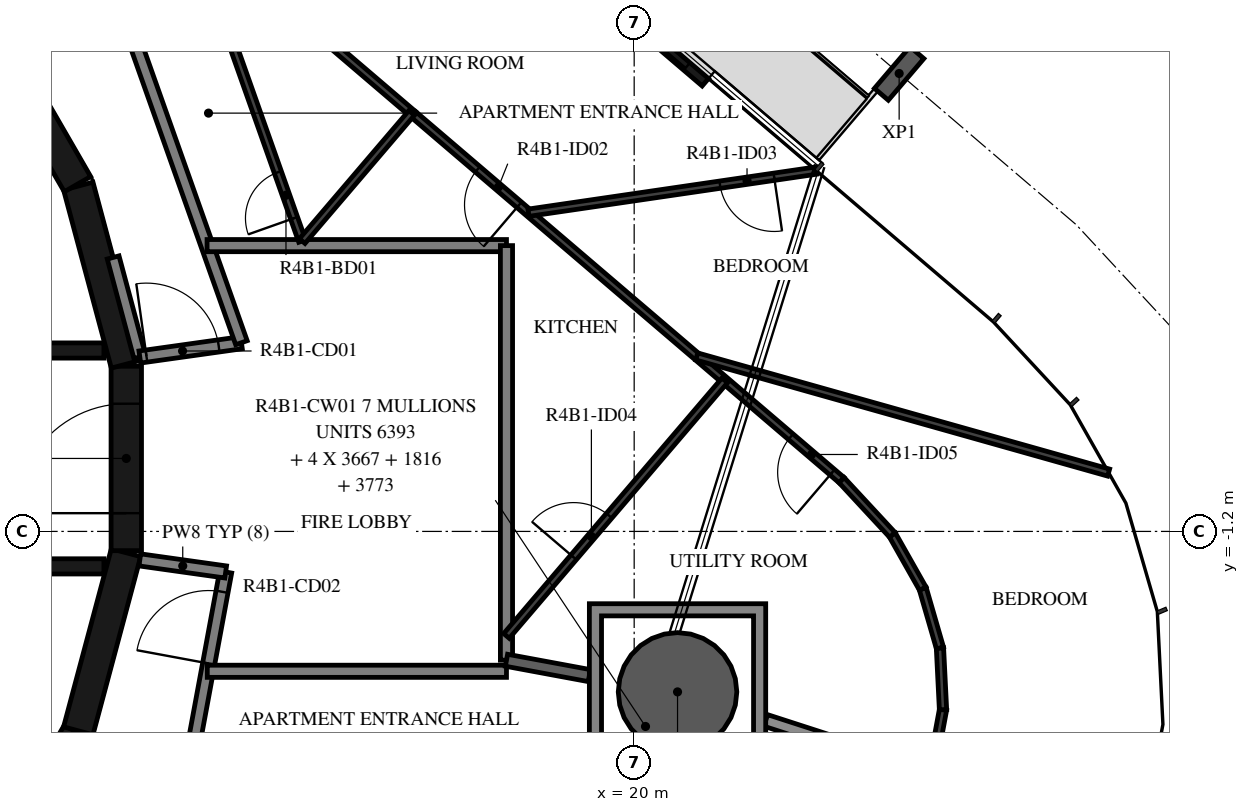
"""IFC4 building model, lengths in metres.
Left out: names, types, materials, properties, quantities, classifications, styles, units other than length and angle.
Written with IfcOpenShell. Run it as: python <this file> out.ifc"""

import sys

from ifc_helpers import new_model, si_unit, direction, frame, frame_2d, origin, origin_2d, place, context, subcontext, project, spatial, polyline, rectangle, hollow_circle, i_section, outline, extrude, element, fill, save


model = new_model("IFC4")
c1 = context("Model", 3, precision=1e-05, world=origin(), true_north=direction((0.0, 1.0)))
c2 = subcontext(c1, "Body", "Model", "MODEL_VIEW")
j1 = project(units=[si_unit("LENGTHUNIT", "METRE"), si_unit("PLANEANGLEUNIT", "RADIAN")], contexts=[c1])
p1 = place(None, origin())
s1 = spatial("IfcSite", under=j1, at=p1, CompositionType="ELEMENT")
p2 = place(p1, origin())
s2 = spatial("IfcBuilding", under=s1, at=p2, CompositionType="ELEMENT")
p3 = place(p2, frame((0.0, 0.0, 162.2)))
s3 = spatial("IfcBuildingStorey", under=s2, at=p3, CompositionType="ELEMENT", Elevation=162.2)
p4 = place(p3, frame((20.713, -3.839, -0.38), z_axis=(0.0, 0.0, 1.0), x_axis=(1.0, 0.0, 0.0)))
e1 = element("IfcColumn", 1, at=p4, inside=s3, PredefinedType="COLUMN", context=c2, shape_type="SweptSolid", body=[
    extrude(hollow_circle(Radius=0.975, WallThickness=0.045, at=origin_2d()), origin(), (0.0, 0.0, 1.0), 3.5),
])
p5 = place(p3, frame((24.358, 6.331, -0.38), z_axis=(0.0, 0.0, 1.0), x_axis=(0.76040600398, -0.649448003393, 0.0)))
e2 = element("IfcColumn", 2, at=p5, inside=s3, PredefinedType="COLUMN", context=c2, shape_type="SweptSolid", body=[
    extrude(i_section(OverallWidth=0.3, OverallDepth=0.9, WebThickness=0.019, FlangeThickness=0.035, FilletRadius=0.03, at=origin_2d()), origin(), (0.0, 0.0, 1.0), 3.5),
])
p6 = place(p3, frame((21.17, 6.186, 0.0), z_axis=(0.0, 0.0, 1.0), x_axis=(-0.760359548534, 0.649502391799, 0.0)))
e3 = element("IfcWall", 3, at=p6, inside=s3, PredefinedType="STANDARD", context=c2, shape_type="SweptSolid", body=[
    extrude(rectangle(XDim=3.2, YDim=0.16, at=frame_2d((1.6, 0.0))), origin(), (0.0, 0.0, 1.0), 3.12),
])
p7 = place(p6, frame((0.4, 0.0, 0.0)))
e4 = element("IfcOpeningElement", 4, at=p7, cuts=e3, PredefinedType="OPENING", context=c2, shape_type="SweptSolid", body=[
    extrude(rectangle(XDim=2.4, YDim=2.4, at=frame_2d((1.2, 1.2))), frame((0.0, 0.09, 0.0), z_axis=(0.0, -1.0, 0.0), x_axis=(1.0, 0.0, 0.0)), (0.0, 0.0, 1.0), 0.18),
])
for number, where, z_axis, x_axis in (
    (5, (9.329, -7.137, 0.0), (0.0, 0.0, 1.0), (0.5, 0.866, 0.0)),
    (6, (10.858, -4.479, 0.0), (0.0, 0.0, 1.0), (0.259, 0.966, 0.0)),
):
    element("IfcWall", number, at=place(p3, frame(where, z_axis=z_axis, x_axis=x_axis)), inside=s3, PredefinedType="SHEAR", context=c2, shape_type="SweptSolid", body=[
        extrude(rectangle(XDim=3.033, YDim=0.5, at=frame_2d((1.516, 0.0))), origin(), (0.0, 0.0, 1.0), 3.12),
    ])
p8 = place(p3, frame((11.647, -1.516, 0.0), z_axis=(0.0, 0.0, 1.0), x_axis=(0.0, 1.0, 0.0)))
e7 = element("IfcWall", 7, at=p8, inside=s3, PredefinedType="SHEAR", context=c2, shape_type="SweptSolid", body=[
    extrude(rectangle(XDim=3.033, YDim=0.5, at=frame_2d((1.516, 0.0))), origin(), (0.0, 0.0, 1.0), 3.12),
])
p9 = place(p8, frame((0.616, 0.0, 0.0)))
e8 = element("IfcOpeningElement", 8, at=p9, cuts=e7, PredefinedType="OPENING", context=c2, shape_type="SweptSolid", body=[
    extrude(rectangle(XDim=1.8, YDim=2.1, at=frame_2d((0.9, 1.05))), frame((0.0, 0.26, 0.0), z_axis=(0.0, -1.0, 0.0), x_axis=(1.0, 0.0, 0.0)), (0.0, 0.0, 1.0), 0.52),
])
for number, where, z_axis, x_axis in (
    (9, (11.643, 1.55, 0.0), (0.0, 0.0, 1.0), (-0.259, 0.966, 0.0)),
    (10, (10.845, 4.51, 0.0), (0.0, 0.0, 1.0), (-0.5, 0.866, 0.0)),
):
    element("IfcWall", number, at=place(p3, frame(where, z_axis=z_axis, x_axis=x_axis)), inside=s3, PredefinedType="SHEAR", context=c2, shape_type="SweptSolid", body=[
        extrude(rectangle(XDim=3.033, YDim=0.5, at=frame_2d((1.516, 0.0))), origin(), (0.0, 0.0, 1.0), 3.12),
    ])
p10 = place(p3, frame((3.35, 1.775, 0.0), z_axis=(0.0, 0.0, 1.0), x_axis=(1.0, 0.0, 0.0)))
e11 = element("IfcWall", 11, at=p10, inside=s3, PredefinedType="SHEAR", context=c2, shape_type="SweptSolid", body=[
    extrude(rectangle(XDim=7.93, YDim=0.25, at=frame_2d((3.965, 0.0))), origin(), (0.0, 0.0, 1.0), 3.12),
])
p11 = place(p10, frame((0.35, 0.0, 0.0)))
e12 = element("IfcOpeningElement", 12, at=p11, cuts=e11, PredefinedType="OPENING", context=c2, shape_type="SweptSolid", body=[
    extrude(rectangle(XDim=1.2, YDim=2.4, at=frame_2d((0.6, 1.2))), frame((0.0, 0.135, 0.0), z_axis=(0.0, -1.0, 0.0), x_axis=(1.0, 0.0, 0.0)), (0.0, 0.0, 1.0), 0.27),
])
p12 = place(p10, frame((2.5, 0.0, 0.0)))
e13 = element("IfcOpeningElement", 13, at=p12, cuts=e11, PredefinedType="OPENING", context=c2, shape_type="SweptSolid", body=[
    extrude(rectangle(XDim=1.2, YDim=2.4, at=frame_2d((0.6, 1.2))), frame((0.0, 0.135, 0.0), z_axis=(0.0, -1.0, 0.0), x_axis=(1.0, 0.0, 0.0)), (0.0, 0.0, 1.0), 0.27),
])
p13 = place(p10, frame((4.8, 0.0, 0.0)))
e14 = element("IfcOpeningElement", 14, at=p13, cuts=e11, PredefinedType="OPENING", context=c2, shape_type="SweptSolid", body=[
    extrude(rectangle(XDim=0.9, YDim=2.1, at=frame_2d((0.45, 1.05))), frame((0.0, 0.135, 0.0), z_axis=(0.0, -1.0, 0.0), x_axis=(1.0, 0.0, 0.0)), (0.0, 0.0, 1.0), 0.27),
])
p14 = place(p3, frame((3.35, -1.775, 0.0), z_axis=(0.0, 0.0, 1.0), x_axis=(1.0, 0.0, 0.0)))
e15 = element("IfcWall", 15, at=p14, inside=s3, PredefinedType="SHEAR", context=c2, shape_type="SweptSolid", body=[
    extrude(rectangle(XDim=7.93, YDim=0.25, at=frame_2d((3.965, 0.0))), origin(), (0.0, 0.0, 1.0), 3.12),
])
p15 = place(p14, frame((0.4, 0.0, 0.0)))
e16 = element("IfcOpeningElement", 16, at=p15, cuts=e15, PredefinedType="OPENING", context=c2, shape_type="SweptSolid", body=[
    extrude(rectangle(XDim=1.1, YDim=2.4, at=frame_2d((0.55, 1.2))), frame((0.0, 0.135, 0.0), z_axis=(0.0, -1.0, 0.0), x_axis=(1.0, 0.0, 0.0)), (0.0, 0.0, 1.0), 0.27),
])
p16 = place(p14, frame((2.55, 0.0, 0.0)))
e17 = element("IfcOpeningElement", 17, at=p16, cuts=e15, PredefinedType="OPENING", context=c2, shape_type="SweptSolid", body=[
    extrude(rectangle(XDim=1.1, YDim=2.4, at=frame_2d((0.55, 1.2))), frame((0.0, 0.135, 0.0), z_axis=(0.0, -1.0, 0.0), x_axis=(1.0, 0.0, 0.0)), (0.0, 0.0, 1.0), 0.27),
])
p17 = place(p14, frame((4.7, 0.0, 0.0)))
e18 = element("IfcOpeningElement", 18, at=p17, cuts=e15, PredefinedType="OPENING", context=c2, shape_type="SweptSolid", body=[
    extrude(rectangle(XDim=1.1, YDim=2.4, at=frame_2d((0.55, 1.2))), frame((0.0, 0.135, 0.0), z_axis=(0.0, -1.0, 0.0), x_axis=(1.0, 0.0, 0.0)), (0.0, 0.0, 1.0), 0.27),
])
p18 = place(p3, frame((11.87, 1.668, 0.0), z_axis=(0.0, 0.0, 1.0), x_axis=(-0.258836880648, 0.965921047093, 0.0)))
e19 = element("IfcWall", 19, at=p18, inside=s3, PredefinedType="STANDARD", context=c2, shape_type="SweptSolid", body=[
    extrude(rectangle(XDim=1.695, YDim=0.2, at=frame_2d((0.848, 0.0))), origin(), (0.0, 0.0, 1.0), 3.12),
])
p19 = place(p3, frame((11.87, 1.668, 0.0), z_axis=(0.0, 0.0, 1.0), x_axis=(0.990270910415, 0.139152879904, 0.0)))
e20 = element("IfcWall", 20, at=p19, inside=s3, PredefinedType="STANDARD", context=c2, shape_type="SweptSolid", body=[
    extrude(rectangle(XDim=1.688, YDim=0.2, at=frame_2d((0.844, 0.0))), origin(), (0.0, 0.0, 1.0), 3.12),
])
p20 = place(p19, frame((0.11, 0.0, 0.0)))
e21 = element("IfcOpeningElement", 21, at=p20, cuts=e20, PredefinedType="OPENING", context=c2, shape_type="SweptSolid", body=[
    extrude(rectangle(XDim=1.2, YDim=2.1, at=frame_2d((0.6, 1.05))), frame((0.0, 0.11, 0.0), z_axis=(0.0, -1.0, 0.0), x_axis=(1.0, 0.0, 0.0)), (0.0, 0.0, 1.0), 0.22),
])
p21 = place(p3, frame((13.542, 1.903, 0.0), z_axis=(0.0, 0.0, 1.0), x_axis=(-0.333808508206, 0.942640907159, 0.0)))
e22 = element("IfcWall", 22, at=p21, inside=s3, PredefinedType="STANDARD", context=c2, shape_type="SweptSolid", body=[
    extrude(rectangle(XDim=6.317, YDim=0.2, at=frame_2d((3.158, 0.0))), origin(), (0.0, 0.0, 1.0), 3.12),
])
p22 = place(p3, frame((12.521, -5.972, 0.0), z_axis=(0.0, 0.0, 1.0), x_axis=(0.182244189886, 0.983253301674, 0.0)))
e23 = element("IfcWall", 23, at=p22, inside=s3, PredefinedType="STANDARD", context=c2, shape_type="SweptSolid", body=[
    extrude(rectangle(XDim=4.176, YDim=0.2, at=frame_2d((2.088, 0.0))), origin(), (0.0, 0.0, 1.0), 3.12),
])
p23 = place(p22, frame((2.645, 0.0, 0.0)))
e24 = element("IfcOpeningElement", 24, at=p23, cuts=e23, PredefinedType="OPENING", context=c2, shape_type="SweptSolid", body=[
    extrude(rectangle(XDim=1.2, YDim=2.1, at=frame_2d((0.6, 1.05))), frame((0.0, 0.11, 0.0), z_axis=(0.0, -1.0, 0.0), x_axis=(1.0, 0.0, 0.0)), (0.0, 0.0, 1.0), 0.22),
])
p24 = place(p3, frame((13.282, -1.867, 0.0), z_axis=(0.0, 0.0, 1.0), x_axis=(-0.990265430288, 0.139191873241, 0.0)))
e25 = element("IfcWall", 25, at=p24, inside=s3, PredefinedType="STANDARD", context=c2, shape_type="SweptSolid", body=[
    extrude(rectangle(XDim=1.426, YDim=0.2, at=frame_2d((0.713, 0.0))), origin(), (0.0, 0.0, 1.0), 3.12),
])
p25 = place(p3, frame((17.9, 3.5, 0.0), z_axis=(0.0, 0.0, 1.0), x_axis=(-1.0, 0.0, 0.0)))
e26 = element("IfcWall", 26, at=p25, inside=s3, PredefinedType="STANDARD", context=c2, shape_type="SweptSolid", body=[
    extrude(rectangle(XDim=4.924, YDim=0.2, at=frame_2d((2.462, 0.0))), origin(), (0.0, 0.0, 1.0), 3.12),
])
p26 = place(p3, frame((17.9, -3.318, 0.0), z_axis=(0.0, 0.0, 1.0), x_axis=(0.0, 1.0, 0.0)))
e27 = element("IfcWall", 27, at=p26, inside=s3, PredefinedType="STANDARD", context=c2, shape_type="SweptSolid", body=[
    extrude(rectangle(XDim=6.818, YDim=0.2, at=frame_2d((3.409, 0.0))), origin(), (0.0, 0.0, 1.0), 3.12),
])
p27 = place(p3, frame((12.979, -3.5, 0.0), z_axis=(0.0, 0.0, 1.0), x_axis=(1.0, 0.0, 0.0)))
e28 = element("IfcWall", 28, at=p27, inside=s3, PredefinedType="STANDARD", context=c2, shape_type="SweptSolid", body=[
    extrude(rectangle(XDim=4.92, YDim=0.2, at=frame_2d((2.46, 0.0))), origin(), (0.0, 0.0, 1.0), 3.12),
])
p28 = place(p3, frame((17.9, -3.319, 0.0), z_axis=(0.0, 0.0, 1.0), x_axis=(0.983246950753, -0.182278451375, 0.0)))
e29 = element("IfcWall", 29, at=p28, inside=s3, PredefinedType="STANDARD", context=c2, shape_type="SweptSolid", body=[
    extrude(rectangle(XDim=1.386, YDim=0.2, at=frame_2d((0.693, 0.0))), origin(), (0.0, 0.0, 1.0), 3.12),
])
p29 = place(p3, frame((22.163, -4.308, 0.0), z_axis=(0.0, 0.0, 1.0), x_axis=(0.951422718769, -0.307887658426, 0.0)))
e30 = element("IfcWall", 30, at=p29, inside=s3, PredefinedType="STANDARD", context=c2, shape_type="SweptSolid", body=[
    extrude(rectangle(XDim=6.464, YDim=0.2, at=frame_2d((3.232, 0.0))), origin(), (0.0, 0.0, 1.0), 2.73),
])
p30 = place(p3, frame((14.541, 3.575, 0.0), z_axis=(0.0, 0.0, 1.0), x_axis=(-0.333799280318, 0.942644174893, 0.0)))
e31 = element("IfcWall", 31, at=p30, inside=s3, PredefinedType="PARTITIONING", context=c2, shape_type="SweptSolid", body=[
    extrude(rectangle(XDim=5.477, YDim=0.12, at=frame_2d((2.738, 0.0))), origin(), (0.0, 0.0, 1.0), 3.12),
])
p31 = place(p30, frame((0.4, 0.0, 0.0)))
e32 = element("IfcOpeningElement", 32, at=p31, cuts=e31, PredefinedType="OPENING", context=c2, shape_type="SweptSolid", body=[
    extrude(rectangle(XDim=0.8, YDim=2.1, at=frame_2d((0.4, 1.05))), frame((0.0, 0.07, 0.0), z_axis=(0.0, -1.0, 0.0), x_axis=(1.0, 0.0, 0.0)), (0.0, 0.0, 1.0), 0.14),
])
p32 = place(p3, frame((12.734, 8.762, 0.0), z_axis=(0.0, 0.0, 1.0), x_axis=(0.760390484255, -0.649466174219, 0.0)))
e33 = element("IfcWall", 33, at=p32, inside=s3, PredefinedType="PARTITIONING", context=c2, shape_type="SweptSolid", body=[
    extrude(rectangle(XDim=4.783, YDim=0.12, at=frame_2d((2.391, 0.0))), origin(), (0.0, 0.0, 1.0), 3.12),
])
p33 = place(p3, frame((23.411, -0.357, 0.0), z_axis=(0.0, 0.0, 1.0), x_axis=(-0.76041871148, 0.649433124525, 0.0)))
e34 = element("IfcWall", 34, at=p33, inside=s3, PredefinedType="PARTITIONING", context=c2, shape_type="SweptSolid", body=[
    extrude(rectangle(XDim=9.259, YDim=0.12, at=frame_2d((4.629, 0.0))), origin(), (0.0, 0.0, 1.0), 3.12),
])
p34 = place(p33, frame((6.972, 0.0, 0.0)))
e35 = element("IfcOpeningElement", 35, at=p34, cuts=e34, PredefinedType="OPENING", context=c2, shape_type="SweptSolid", body=[
    extrude(rectangle(XDim=0.9, YDim=2.1, at=frame_2d((0.45, 1.05))), frame((0.0, 0.07, 0.0), z_axis=(0.0, -1.0, 0.0), x_axis=(1.0, 0.0, 0.0)), (0.0, 0.0, 1.0), 0.14),
])
p35 = place(p33, frame((0.2, 0.0, 0.0)))
e36 = element("IfcOpeningElement", 36, at=p35, cuts=e34, PredefinedType="OPENING", context=c2, shape_type="SweptSolid", body=[
    extrude(rectangle(XDim=0.9, YDim=2.1, at=frame_2d((0.45, 1.05))), frame((0.0, 0.07, 0.0), z_axis=(0.0, -1.0, 0.0), x_axis=(1.0, 0.0, 0.0)), (0.0, 0.0, 1.0), 0.14),
])
p36 = place(p3, frame((16.341, 5.682, 0.0), z_axis=(0.0, 0.0, 1.0), x_axis=(-0.64946993237, -0.76038727432, 0.0)))
e37 = element("IfcWall", 37, at=p36, inside=s3, PredefinedType="PARTITIONING", context=c2, shape_type="SweptSolid", body=[
    extrude(rectangle(XDim=2.771, YDim=0.12, at=frame_2d((1.386, 0.0))), origin(), (0.0, 0.0, 1.0), 3.12),
])
p37 = place(p3, frame((17.9, -2.918, 0.0), z_axis=(0.0, 0.0, 1.0), x_axis=(0.649469887983, 0.760387312232, 0.0)))
e38 = element("IfcWall", 38, at=p37, inside=s3, PredefinedType="PARTITIONING", context=c2, shape_type="SweptSolid", body=[
    extrude(rectangle(XDim=5.527, YDim=0.12, at=frame_2d((2.763, 0.0))), origin(), (0.0, 0.0, 1.0), 3.12),
])
p38 = place(p37, frame((1.7, 0.0, 0.0)))
e39 = element("IfcOpeningElement", 39, at=p38, cuts=e38, PredefinedType="OPENING", context=c2, shape_type="SweptSolid", body=[
    extrude(rectangle(XDim=0.9, YDim=2.1, at=frame_2d((0.45, 1.05))), frame((0.0, 0.07, 0.0), z_axis=(0.0, -1.0, 0.0), x_axis=(1.0, 0.0, 0.0)), (0.0, 0.0, 1.0), 0.14),
])
p39 = place(p3, frame((22.994, 4.734, 0.0), z_axis=(0.0, 0.0, 1.0), x_axis=(-0.989449286977, -0.144879634529, 0.0)))
e40 = element("IfcWall", 40, at=p39, inside=s3, PredefinedType="PARTITIONING", context=c2, shape_type="SweptSolid", body=[
    extrude(rectangle(XDim=4.782, YDim=0.12, at=frame_2d((2.391, 0.0))), origin(), (0.0, 0.0, 1.0), 3.12),
])
p40 = place(p39, frame((0.7, 0.0, 0.0)))
e41 = element("IfcOpeningElement", 41, at=p40, cuts=e40, PredefinedType="OPENING", context=c2, shape_type="SweptSolid", body=[
    extrude(rectangle(XDim=0.9, YDim=2.1, at=frame_2d((0.45, 1.05))), frame((0.0, 0.07, 0.0), z_axis=(0.0, -1.0, 0.0), x_axis=(1.0, 0.0, 0.0)), (0.0, 0.0, 1.0), 0.14),
])
p41 = place(p3, frame((21.029, 1.677, 0.0), z_axis=(0.0, 0.0, 1.0), x_axis=(0.962458274539, -0.271429677396, 0.0)))
e42 = element("IfcWall", 42, at=p41, inside=s3, PredefinedType="PARTITIONING", context=c2, shape_type="SweptSolid", body=[
    extrude(rectangle(XDim=7.037, YDim=0.12, at=frame_2d((3.519, 0.0))), origin(), (0.0, 0.0, 1.0), 3.12),
])
for number, where, z_axis, x_axis in (
    (43, (24.894, -5.131, 0.0), (0.0, 0.0, 1.0), (0.182, 0.983, 0.0)),
    (44, (25.079, -4.132, 0.0), (0.0, 0.0, 1.0), (-0.049, 0.999, 0.0)),
):
    element("IfcWall", number, at=place(p3, frame(where, z_axis=z_axis, x_axis=x_axis)), inside=s3, PredefinedType="PARTITIONING", context=c2, shape_type="SweptSolid", body=[
        extrude(rectangle(XDim=1.016, YDim=0.12, at=frame_2d((0.508, 0.0))), origin(), (0.0, 0.0, 1.0), 3.12),
    ])
for number, where, z_axis, x_axis in (
    (45, (25.029, -3.117, 0.0), (0.0, 0.0, 1.0), (-0.279, 0.96, 0.0)),
    (46, (24.746, -2.141, 0.0), (0.0, 0.0, 1.0), (-0.492, 0.87, 0.0)),
):
    element("IfcWall", number, at=place(p3, frame(where, z_axis=z_axis, x_axis=x_axis)), inside=s3, PredefinedType="PARTITIONING", context=c2, shape_type="SweptSolid", body=[
        extrude(rectangle(XDim=1.016, YDim=0.12, at=frame_2d((0.508, 0.0))), origin(), (0.0, 0.0, 1.0), 3.12),
    ])
p42 = place(p3, frame((24.246, -1.257, 0.0), z_axis=(0.0, 0.0, 1.0), x_axis=(-0.679840361176, 0.733360132074, 0.0)))
e47 = element("IfcWall", 47, at=p42, inside=s3, PredefinedType="PARTITIONING", context=c2, shape_type="SweptSolid", body=[
    extrude(rectangle(XDim=1.227, YDim=0.12, at=frame_2d((0.614, 0.0))), origin(), (0.0, 0.0, 1.0), 3.12),
])
p43 = place(p3, origin())
e48 = element("IfcWall", 48, at=p43, inside=s3, PredefinedType="STANDARD", context=c2, shape_type="SweptSolid", body=[
    extrude(outline(polyline([(22.163, -2.389), (22.163, -5.289), (19.263, -5.289), (19.263, -2.389), (22.163, -2.389)]), holes=[polyline([(19.463, -5.089), (21.963, -5.089), (21.963, -2.589), (19.463, -2.589), (19.463, -5.089)])]), origin(), (0.0, 0.0, 1.0), 3.12),
])
p44 = place(p7, origin())
e49 = element("IfcDoor", 49, at=p44, inside=s3, OperationType="DOUBLE_DOOR_SLIDING", PredefinedType="DOOR", context=c2, shape_type="SweptSolid", body=[
    extrude(rectangle(XDim=2.4, YDim=2.4, at=frame_2d((1.2, 1.2))), frame((0.0, 0.025, 0.0), z_axis=(0.0, -1.0, 0.0), x_axis=(1.0, 0.0, 0.0)), (0.0, 0.0, 1.0), 0.05),
])
fill(e4, e49)
p45 = place(p9, origin())
e50 = element("IfcDoor", 50, at=p45, inside=s3, OperationType="DOUBLE_DOOR_SINGLE_SWING", PredefinedType="DOOR", context=c2, shape_type="SweptSolid", body=[
    extrude(rectangle(XDim=1.8, YDim=2.1, at=frame_2d((0.9, 1.05))), frame((0.0, 0.025, 0.0), z_axis=(0.0, -1.0, 0.0), x_axis=(1.0, 0.0, 0.0)), (0.0, 0.0, 1.0), 0.05),
])
fill(e8, e50)
p46 = place(p31, origin())
e51 = element("IfcDoor", 51, at=p46, inside=s3, OperationType="SINGLE_SWING_LEFT", PredefinedType="DOOR", context=c2, shape_type="SweptSolid", body=[
    extrude(rectangle(XDim=0.8, YDim=2.1, at=frame_2d((0.4, 1.05))), frame((0.0, 0.025, 0.0), z_axis=(0.0, -1.0, 0.0), x_axis=(1.0, 0.0, 0.0)), (0.0, 0.0, 1.0), 0.05),
])
fill(e32, e51)
p47 = place(p34, origin())
e52 = element("IfcDoor", 52, at=p47, inside=s3, OperationType="SINGLE_SWING_RIGHT", PredefinedType="DOOR", context=c2, shape_type="SweptSolid", body=[
    extrude(rectangle(XDim=0.9, YDim=2.1, at=frame_2d((0.45, 1.05))), frame((0.0, 0.025, 0.0), z_axis=(0.0, -1.0, 0.0), x_axis=(1.0, 0.0, 0.0)), (0.0, 0.0, 1.0), 0.05),
])
fill(e35, e52)
p48 = place(p40, origin())
e53 = element("IfcDoor", 53, at=p48, inside=s3, OperationType="SINGLE_SWING_LEFT", PredefinedType="DOOR", context=c2, shape_type="SweptSolid", body=[
    extrude(rectangle(XDim=0.9, YDim=2.1, at=frame_2d((0.45, 1.05))), frame((0.0, 0.025, 0.0), z_axis=(0.0, -1.0, 0.0), x_axis=(1.0, 0.0, 0.0)), (0.0, 0.0, 1.0), 0.05),
])
fill(e41, e53)
p49 = place(p38, origin())
e54 = element("IfcDoor", 54, at=p49, inside=s3, OperationType="SINGLE_SWING_LEFT", PredefinedType="DOOR", context=c2, shape_type="SweptSolid", body=[
    extrude(rectangle(XDim=0.9, YDim=2.1, at=frame_2d((0.45, 1.05))), frame((0.0, 0.025, 0.0), z_axis=(0.0, -1.0, 0.0), x_axis=(1.0, 0.0, 0.0)), (0.0, 0.0, 1.0), 0.05),
])
fill(e39, e54)
p50 = place(p35, origin())
e55 = element("IfcDoor", 55, at=p50, inside=s3, OperationType="SINGLE_SWING_LEFT", PredefinedType="DOOR", context=c2, shape_type="SweptSolid", body=[
    extrude(rectangle(XDim=0.9, YDim=2.1, at=frame_2d((0.45, 1.05))), frame((0.0, 0.025, 0.0), z_axis=(0.0, -1.0, 0.0), x_axis=(1.0, 0.0, 0.0)), (0.0, 0.0, 1.0), 0.05),
])
fill(e36, e55)
p51 = place(p20, origin())
e56 = element("IfcDoor", 56, at=p51, inside=s3, OperationType="DOUBLE_DOOR_SINGLE_SWING", PredefinedType="DOOR", context=c2, shape_type="SweptSolid", body=[
    extrude(rectangle(XDim=1.2, YDim=2.1, at=frame_2d((0.6, 1.05))), frame((0.0, 0.025, 0.0), z_axis=(0.0, -1.0, 0.0), x_axis=(1.0, 0.0, 0.0)), (0.0, 0.0, 1.0), 0.05),
])
fill(e21, e56)
p52 = place(p23, origin())
e57 = element("IfcDoor", 57, at=p52, inside=s3, OperationType="DOUBLE_DOOR_SINGLE_SWING", PredefinedType="DOOR", context=c2, shape_type="SweptSolid", body=[
    extrude(rectangle(XDim=1.2, YDim=2.1, at=frame_2d((0.6, 1.05))), frame((0.0, 0.025, 0.0), z_axis=(0.0, -1.0, 0.0), x_axis=(1.0, 0.0, 0.0)), (0.0, 0.0, 1.0), 0.05),
])
fill(e24, e57)
save(model, sys.argv[1])
